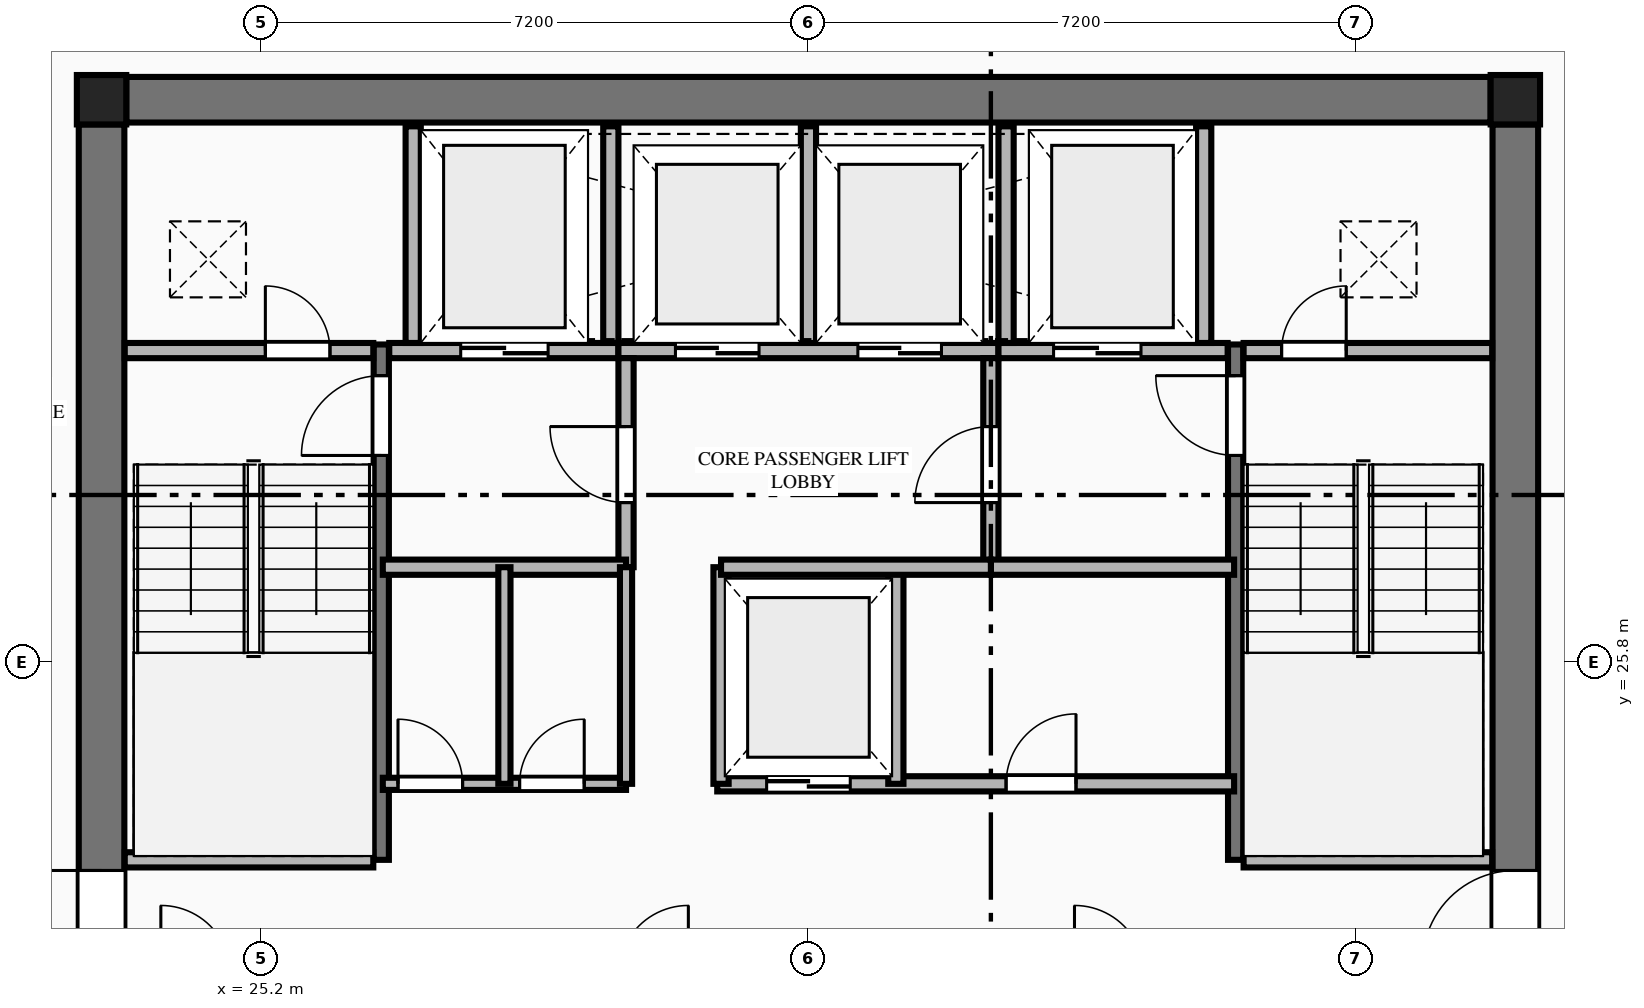
"""IFC4 building model, lengths in metres.
Left out: names, types, materials, properties, quantities, classifications, styles, units other than length and angle.
Written with IfcOpenShell. Run it as: python <this file> out.ifc"""

import sys

from ifc_helpers import new_model, si_unit, direction, frame, frame_2d, origin, origin_2d, place, context, subcontext, project, spatial, rectangle, extrude, element, fill, save


model = new_model("IFC4")
c1 = context("Model", 3, precision=1e-05, world=origin(), true_north=direction((0.0, 1.0)))
c2 = subcontext(c1, "Body", "Model", "MODEL_VIEW")
j1 = project(units=[si_unit("LENGTHUNIT", "METRE"), si_unit("PLANEANGLEUNIT", "RADIAN")], contexts=[c1])
p1 = place(None, origin())
s1 = spatial("IfcSite", under=j1, at=p1, CompositionType="ELEMENT")
p2 = place(p1, origin())
s2 = spatial("IfcBuilding", under=s1, at=p2, CompositionType="ELEMENT")
p3 = place(p2, frame((0.0, 0.0, 182.55)))
s3 = spatial("IfcBuildingStorey", under=s2, at=p3, CompositionType="ELEMENT", Elevation=182.55)
for number, where, z_axis, x_axis in (
    (1, (41.7, 33.2, 0.0), (0.0, 0.0, 1.0), (1.0, 0.0, 0.0)),
    (2, (23.1, 33.2, 0.0), (0.0, 0.0, 1.0), (1.0, 0.0, 0.0)),
):
    element("IfcColumn", number, at=place(p3, frame(where, z_axis=z_axis, x_axis=x_axis)), inside=s3, PredefinedType="COLUMN", context=c2, shape_type="SweptSolid", body=[
        extrude(rectangle(XDim=0.65, YDim=0.65, at=origin_2d()), origin(), (0.0, 0.0, 1.0), 3.55),
    ])
p4 = place(p3, frame((23.425, 33.2, 0.0), z_axis=(0.0, 0.0, 1.0), x_axis=(1.0, 0.0, 0.0)))
e3 = element("IfcWall", 3, at=p4, inside=s3, PredefinedType="SHEAR", context=c2, shape_type="SweptSolid", body=[
    extrude(rectangle(XDim=17.95, YDim=0.6, at=frame_2d((8.975, 0.0))), origin(), (0.0, 0.0, 1.0), 3.35),
])
p5 = place(p3, frame((23.1, 18.925, 0.0), z_axis=(0.0, 0.0, 1.0), x_axis=(0.0, 1.0, 0.0)))
e4 = element("IfcWall", 4, at=p5, inside=s3, PredefinedType="SHEAR", context=c2, shape_type="SweptSolid", body=[
    extrude(rectangle(XDim=13.95, YDim=0.6, at=frame_2d((6.975, 0.0))), origin(), (0.0, 0.0, 1.0), 3.35),
])
p6 = place(p5, frame((2.915, 0.0, 0.0)))
e5 = element("IfcOpeningElement", 5, at=p6, cuts=e4, PredefinedType="OPENING", context=c2, shape_type="SweptSolid", body=[
    extrude(rectangle(XDim=1.22, YDim=2.25, at=frame_2d((0.61, 1.125))), frame((0.0, 0.31, 0.0), z_axis=(0.0, -1.0, 0.0), x_axis=(1.0, 0.0, 0.0)), (0.0, 0.0, 1.0), 0.62),
])
p7 = place(p3, frame((41.7, 18.925, 0.0), z_axis=(0.0, 0.0, 1.0), x_axis=(0.0, 1.0, 0.0)))
e6 = element("IfcWall", 6, at=p7, inside=s3, PredefinedType="SHEAR", context=c2, shape_type="SweptSolid", body=[
    extrude(rectangle(XDim=13.95, YDim=0.6, at=frame_2d((6.975, 0.0))), origin(), (0.0, 0.0, 1.0), 3.35),
])
p8 = place(p7, frame((2.915, 0.0, 0.0)))
e7 = element("IfcOpeningElement", 7, at=p8, cuts=e6, PredefinedType="OPENING", context=c2, shape_type="SweptSolid", body=[
    extrude(rectangle(XDim=1.22, YDim=2.25, at=frame_2d((0.61, 1.125))), frame((0.0, 0.31, 0.0), z_axis=(0.0, -1.0, 0.0), x_axis=(1.0, 0.0, 0.0)), (0.0, 0.0, 1.0), 0.62),
])
p9 = place(p3, frame((26.78, 23.2, 0.0), z_axis=(0.0, 0.0, 1.0), x_axis=(0.0, 1.0, 0.0)))
e8 = element("IfcWall", 8, at=p9, inside=s3, PredefinedType="SHEAR", context=c2, shape_type="SweptSolid", body=[
    extrude(rectangle(XDim=6.78, YDim=0.2, at=frame_2d((3.39, 0.0))), origin(), (0.0, 0.0, 1.0), 3.55),
])
p10 = place(p9, frame((5.32, 0.0, 0.0)))
e9 = element("IfcOpeningElement", 9, at=p10, cuts=e8, PredefinedType="OPENING", context=c2, shape_type="SweptSolid", body=[
    extrude(rectangle(XDim=1.05, YDim=2.15, at=frame_2d((0.525, 1.075))), frame((0.0, 0.11, 0.0), z_axis=(0.0, -1.0, 0.0), x_axis=(1.0, 0.0, 0.0)), (0.0, 0.0, 1.0), 0.22),
])
p11 = place(p3, frame((23.405, 23.2, 0.0), z_axis=(0.0, 0.0, 1.0), x_axis=(1.0, 0.0, 0.0)))
e10 = element("IfcWall", 10, at=p11, inside=s3, PredefinedType="PLUMBINGWALL", context=c2, shape_type="SweptSolid", body=[
    extrude(rectangle(XDim=3.27, YDim=0.2, at=frame_2d((1.635, 0.0))), origin(), (0.0, 0.0, 1.0), 3.35),
])
p12 = place(p3, frame((38.02, 23.2, 0.0), z_axis=(0.0, 0.0, 1.0), x_axis=(0.0, 1.0, 0.0)))
e11 = element("IfcWall", 11, at=p12, inside=s3, PredefinedType="SHEAR", context=c2, shape_type="SweptSolid", body=[
    extrude(rectangle(XDim=6.78, YDim=0.2, at=frame_2d((3.39, 0.0))), origin(), (0.0, 0.0, 1.0), 3.55),
])
p13 = place(p12, frame((5.32, 0.0, 0.0)))
e12 = element("IfcOpeningElement", 12, at=p13, cuts=e11, PredefinedType="OPENING", context=c2, shape_type="SweptSolid", body=[
    extrude(rectangle(XDim=1.05, YDim=2.15, at=frame_2d((0.525, 1.075))), frame((0.0, 0.11, 0.0), z_axis=(0.0, -1.0, 0.0), x_axis=(1.0, 0.0, 0.0)), (0.0, 0.0, 1.0), 0.22),
])
p14 = place(p3, frame((38.125, 23.2, 0.0), z_axis=(0.0, 0.0, 1.0), x_axis=(1.0, 0.0, 0.0)))
e13 = element("IfcWall", 13, at=p14, inside=s3, PredefinedType="PLUMBINGWALL", context=c2, shape_type="SweptSolid", body=[
    extrude(rectangle(XDim=3.27, YDim=0.2, at=frame_2d((1.635, 0.0))), origin(), (0.0, 0.0, 1.0), 3.35),
])
p15 = place(p3, frame((23.405, 29.9, 0.0), z_axis=(0.0, 0.0, 1.0), x_axis=(1.0, 0.0, 0.0)))
e14 = element("IfcWall", 14, at=p15, inside=s3, PredefinedType="PLUMBINGWALL", context=c2, shape_type="SweptSolid", body=[
    extrude(rectangle(XDim=3.27, YDim=0.2, at=frame_2d((1.635, 0.0))), origin(), (0.0, 0.0, 1.0), 3.35),
])
p16 = place(p15, frame((1.85, 0.0, 0.0)))
e15 = element("IfcOpeningElement", 15, at=p16, cuts=e14, PredefinedType="OPENING", context=c2, shape_type="SweptSolid", body=[
    extrude(rectangle(XDim=0.85, YDim=2.05, at=frame_2d((0.425, 1.025))), frame((0.0, 0.11, 0.0), z_axis=(0.0, -1.0, 0.0), x_axis=(1.0, 0.0, 0.0)), (0.0, 0.0, 1.0), 0.22),
])
p17 = place(p3, frame((26.885, 29.9, 0.0), z_axis=(0.0, 0.0, 1.0), x_axis=(1.0, 0.0, 0.0)))
e16 = element("IfcWall", 16, at=p17, inside=s3, PredefinedType="PLUMBINGWALL", context=c2, shape_type="SweptSolid", body=[
    extrude(rectangle(XDim=3.015, YDim=0.2, at=frame_2d((1.507, 0.0))), origin(), (0.0, 0.0, 1.0), 3.35),
])
p18 = place(p17, frame((0.94, 0.0, 0.0)))
e17 = element("IfcOpeningElement", 17, at=p18, cuts=e16, PredefinedType="OPENING", context=c2, shape_type="SweptSolid", body=[
    extrude(rectangle(XDim=1.15, YDim=2.2, at=frame_2d((0.575, 1.1))), frame((0.0, 0.11, 0.0), z_axis=(0.0, -1.0, 0.0), x_axis=(1.0, 0.0, 0.0)), (0.0, 0.0, 1.0), 0.22),
])
p19 = place(p3, frame((29.9, 29.9, 0.0), z_axis=(0.0, 0.0, 1.0), x_axis=(1.0, 0.0, 0.0)))
e18 = element("IfcWall", 18, at=p19, inside=s3, PredefinedType="PLUMBINGWALL", context=c2, shape_type="SweptSolid", body=[
    extrude(rectangle(XDim=5.0, YDim=0.2, at=frame_2d((2.5, 0.0))), origin(), (0.0, 0.0, 1.0), 3.35),
])
p20 = place(p19, frame((0.75, 0.0, 0.0)))
e19 = element("IfcOpeningElement", 19, at=p20, cuts=e18, PredefinedType="OPENING", context=c2, shape_type="SweptSolid", body=[
    extrude(rectangle(XDim=1.1, YDim=2.2, at=frame_2d((0.55, 1.1))), frame((0.0, 0.11, 0.0), z_axis=(0.0, -1.0, 0.0), x_axis=(1.0, 0.0, 0.0)), (0.0, 0.0, 1.0), 0.22),
])
p21 = place(p19, frame((3.15, 0.0, 0.0)))
e20 = element("IfcOpeningElement", 20, at=p21, cuts=e18, PredefinedType="OPENING", context=c2, shape_type="SweptSolid", body=[
    extrude(rectangle(XDim=1.1, YDim=2.2, at=frame_2d((0.55, 1.1))), frame((0.0, 0.11, 0.0), z_axis=(0.0, -1.0, 0.0), x_axis=(1.0, 0.0, 0.0)), (0.0, 0.0, 1.0), 0.22),
])
p22 = place(p3, frame((34.9, 29.9, 0.0), z_axis=(0.0, 0.0, 1.0), x_axis=(1.0, 0.0, 0.0)))
e21 = element("IfcWall", 21, at=p22, inside=s3, PredefinedType="PLUMBINGWALL", context=c2, shape_type="SweptSolid", body=[
    extrude(rectangle(XDim=3.015, YDim=0.2, at=frame_2d((1.508, 0.0))), origin(), (0.0, 0.0, 1.0), 3.35),
])
p23 = place(p22, frame((0.725, 0.0, 0.0)))
e22 = element("IfcOpeningElement", 22, at=p23, cuts=e21, PredefinedType="OPENING", context=c2, shape_type="SweptSolid", body=[
    extrude(rectangle(XDim=1.15, YDim=2.2, at=frame_2d((0.575, 1.1))), frame((0.0, 0.11, 0.0), z_axis=(0.0, -1.0, 0.0), x_axis=(1.0, 0.0, 0.0)), (0.0, 0.0, 1.0), 0.22),
])
p24 = place(p3, frame((38.125, 29.9, 0.0), z_axis=(0.0, 0.0, 1.0), x_axis=(1.0, 0.0, 0.0)))
e23 = element("IfcWall", 23, at=p24, inside=s3, PredefinedType="PLUMBINGWALL", context=c2, shape_type="SweptSolid", body=[
    extrude(rectangle(XDim=3.27, YDim=0.2, at=frame_2d((1.635, 0.0))), origin(), (0.0, 0.0, 1.0), 3.35),
])
p25 = place(p24, frame((0.5, 0.0, 0.0)))
e24 = element("IfcOpeningElement", 24, at=p25, cuts=e23, PredefinedType="OPENING", context=c2, shape_type="SweptSolid", body=[
    extrude(rectangle(XDim=0.85, YDim=2.05, at=frame_2d((0.425, 1.025))), frame((0.0, 0.11, 0.0), z_axis=(0.0, -1.0, 0.0), x_axis=(1.0, 0.0, 0.0)), (0.0, 0.0, 1.0), 0.22),
])
for number, where, z_axis, x_axis in (
    (25, (27.2, 30.0, 0.0), (0.0, 0.0, 1.0), (0.0, 1.0, 0.0)),
    (26, (29.8, 30.0, 0.0), (0.0, 0.0, 1.0), (0.0, 1.0, 0.0)),
    (27, (32.4, 30.0, 0.0), (0.0, 0.0, 1.0), (0.0, 1.0, 0.0)),
    (28, (35.0, 30.0, 0.0), (0.0, 0.0, 1.0), (0.0, 1.0, 0.0)),
    (29, (37.6, 30.0, 0.0), (0.0, 0.0, 1.0), (0.0, 1.0, 0.0)),
):
    element("IfcWall", number, at=place(p3, frame(where, z_axis=z_axis, x_axis=x_axis)), inside=s3, PredefinedType="PLUMBINGWALL", context=c2, shape_type="SweptSolid", body=[
        extrude(rectangle(XDim=2.85, YDim=0.2, at=frame_2d((1.425, 0.0))), origin(), (0.0, 0.0, 1.0), 3.35),
    ])
p26 = place(p3, frame((30.0, 27.05, 0.0), z_axis=(0.0, 0.0, 1.0), x_axis=(0.0, 1.0, 0.0)))
e30 = element("IfcWall", 30, at=p26, inside=s3, PredefinedType="PLUMBINGWALL", context=c2, shape_type="SweptSolid", body=[
    extrude(rectangle(XDim=2.75, YDim=0.2, at=frame_2d((1.375, 0.0))), origin(), (0.0, 0.0, 1.0), 3.35),
])
p27 = place(p26, frame((0.85, 0.0, 0.0)))
e31 = element("IfcOpeningElement", 31, at=p27, cuts=e30, PredefinedType="OPENING", context=c2, shape_type="SweptSolid", body=[
    extrude(rectangle(XDim=1.0, YDim=2.15, at=frame_2d((0.5, 1.075))), frame((0.0, 0.11, 0.0), z_axis=(0.0, -1.0, 0.0), x_axis=(1.0, 0.0, 0.0)), (0.0, 0.0, 1.0), 0.22),
])
p28 = place(p3, frame((26.8, 27.05, 0.0), z_axis=(0.0, 0.0, 1.0), x_axis=(1.0, 0.0, 0.0)))
e32 = element("IfcWall", 32, at=p28, inside=s3, PredefinedType="PLUMBINGWALL", context=c2, shape_type="SweptSolid", body=[
    extrude(rectangle(XDim=3.2, YDim=0.2, at=frame_2d((1.6, 0.0))), origin(), (0.0, 0.0, 1.0), 3.35),
])
p29 = place(p3, frame((34.8, 27.05, 0.0), z_axis=(0.0, 0.0, 1.0), x_axis=(0.0, 1.0, 0.0)))
e33 = element("IfcWall", 33, at=p29, inside=s3, PredefinedType="PLUMBINGWALL", context=c2, shape_type="SweptSolid", body=[
    extrude(rectangle(XDim=2.75, YDim=0.2, at=frame_2d((1.375, 0.0))), origin(), (0.0, 0.0, 1.0), 3.35),
])
p30 = place(p29, frame((0.85, 0.0, 0.0)))
e34 = element("IfcOpeningElement", 34, at=p30, cuts=e33, PredefinedType="OPENING", context=c2, shape_type="SweptSolid", body=[
    extrude(rectangle(XDim=1.0, YDim=2.15, at=frame_2d((0.5, 1.075))), frame((0.0, 0.11, 0.0), z_axis=(0.0, -1.0, 0.0), x_axis=(1.0, 0.0, 0.0)), (0.0, 0.0, 1.0), 0.22),
])
p31 = place(p3, frame((34.8, 27.05, 0.0), z_axis=(0.0, 0.0, 1.0), x_axis=(1.0, 0.0, 0.0)))
e35 = element("IfcWall", 35, at=p31, inside=s3, PredefinedType="PLUMBINGWALL", context=c2, shape_type="SweptSolid", body=[
    extrude(rectangle(XDim=3.2, YDim=0.2, at=frame_2d((1.6, 0.0))), origin(), (0.0, 0.0, 1.0), 3.35),
])
p32 = place(p3, frame((26.8, 24.2, 0.0), z_axis=(0.0, 0.0, 1.0), x_axis=(1.0, 0.0, 0.0)))
e36 = element("IfcWall", 36, at=p32, inside=s3, PredefinedType="PARTITIONING", context=c2, shape_type="SweptSolid", body=[
    extrude(rectangle(XDim=3.2, YDim=0.16, at=frame_2d((1.6, 0.0))), origin(), (0.0, 0.0, 1.0), 3.35),
])
p33 = place(p32, frame((0.2, 0.0, 0.0)))
e37 = element("IfcOpeningElement", 37, at=p33, cuts=e36, PredefinedType="OPENING", context=c2, shape_type="SweptSolid", body=[
    extrude(rectangle(XDim=0.85, YDim=2.05, at=frame_2d((0.425, 1.025))), frame((0.0, 0.09, 0.0), z_axis=(0.0, -1.0, 0.0), x_axis=(1.0, 0.0, 0.0)), (0.0, 0.0, 1.0), 0.18),
])
p34 = place(p32, frame((1.8, 0.0, 0.0)))
e38 = element("IfcOpeningElement", 38, at=p34, cuts=e36, PredefinedType="OPENING", context=c2, shape_type="SweptSolid", body=[
    extrude(rectangle(XDim=0.85, YDim=2.05, at=frame_2d((0.425, 1.025))), frame((0.0, 0.09, 0.0), z_axis=(0.0, -1.0, 0.0), x_axis=(1.0, 0.0, 0.0)), (0.0, 0.0, 1.0), 0.18),
])
p35 = place(p3, frame((30.0, 24.2, 0.0), z_axis=(0.0, 0.0, 1.0), x_axis=(0.0, 1.0, 0.0)))
e39 = element("IfcWall", 39, at=p35, inside=s3, PredefinedType="PARTITIONING", context=c2, shape_type="SweptSolid", body=[
    extrude(rectangle(XDim=2.85, YDim=0.16, at=frame_2d((1.425, 0.0))), origin(), (0.0, 0.0, 1.0), 3.35),
])
p36 = place(p3, frame((31.2, 24.2, 0.0), z_axis=(0.0, 0.0, 1.0), x_axis=(1.0, 0.0, 0.0)))
e40 = element("IfcWall", 40, at=p36, inside=s3, PredefinedType="PLUMBINGWALL", context=c2, shape_type="SweptSolid", body=[
    extrude(rectangle(XDim=6.8, YDim=0.2, at=frame_2d((3.4, 0.0))), origin(), (0.0, 0.0, 1.0), 3.35),
])
p37 = place(p36, frame((0.65, 0.0, 0.0)))
e41 = element("IfcOpeningElement", 41, at=p37, cuts=e40, PredefinedType="OPENING", context=c2, shape_type="SweptSolid", body=[
    extrude(rectangle(XDim=1.1, YDim=2.2, at=frame_2d((0.55, 1.1))), frame((0.0, 0.11, 0.0), z_axis=(0.0, -1.0, 0.0), x_axis=(1.0, 0.0, 0.0)), (0.0, 0.0, 1.0), 0.22),
])
p38 = place(p36, frame((3.8, 0.0, 0.0)))
e42 = element("IfcOpeningElement", 42, at=p38, cuts=e40, PredefinedType="OPENING", context=c2, shape_type="SweptSolid", body=[
    extrude(rectangle(XDim=0.92, YDim=2.15, at=frame_2d((0.46, 1.075))), frame((0.0, 0.11, 0.0), z_axis=(0.0, -1.0, 0.0), x_axis=(1.0, 0.0, 0.0)), (0.0, 0.0, 1.0), 0.22),
])
for number, where, z_axis, x_axis in (
    (43, (31.25, 24.2, 0.0), (0.0, 0.0, 1.0), (0.0, 1.0, 0.0)),
    (44, (33.55, 24.2, 0.0), (0.0, 0.0, 1.0), (0.0, 1.0, 0.0)),
):
    element("IfcWall", number, at=place(p3, frame(where, z_axis=z_axis, x_axis=x_axis)), inside=s3, PredefinedType="PLUMBINGWALL", context=c2, shape_type="SweptSolid", body=[
        extrude(rectangle(XDim=2.85, YDim=0.2, at=frame_2d((1.425, 0.0))), origin(), (0.0, 0.0, 1.0), 3.35),
    ])
p39 = place(p3, frame((31.25, 27.05, 0.0), z_axis=(0.0, 0.0, 1.0), x_axis=(1.0, 0.0, 0.0)))
e45 = element("IfcWall", 45, at=p39, inside=s3, PredefinedType="PLUMBINGWALL", context=c2, shape_type="SweptSolid", body=[
    extrude(rectangle(XDim=3.55, YDim=0.2, at=frame_2d((1.775, 0.0))), origin(), (0.0, 0.0, 1.0), 3.35),
])
p40 = place(p3, frame((28.4, 24.2, 0.0), z_axis=(0.0, 0.0, 1.0), x_axis=(0.0, 1.0, 0.0)))
e46 = element("IfcWall", 46, at=p40, inside=s3, PredefinedType="PARTITIONING", context=c2, shape_type="SweptSolid", body=[
    extrude(rectangle(XDim=2.85, YDim=0.16, at=frame_2d((1.425, 0.0))), origin(), (0.0, 0.0, 1.0), 3.35),
])
p41 = place(p6, origin())
e47 = element("IfcDoor", 47, at=p41, inside=s3, OperationType="SINGLE_SWING_RIGHT", PredefinedType="DOOR", context=c2, shape_type="SweptSolid", body=[
    extrude(rectangle(XDim=1.22, YDim=2.25, at=frame_2d((0.61, 1.125))), frame((0.0, 0.025, 0.0), z_axis=(0.0, -1.0, 0.0), x_axis=(1.0, 0.0, 0.0)), (0.0, 0.0, 1.0), 0.05),
])
fill(e5, e47)
p42 = place(p8, origin())
e48 = element("IfcDoor", 48, at=p42, inside=s3, OperationType="SINGLE_SWING_LEFT", PredefinedType="DOOR", context=c2, shape_type="SweptSolid", body=[
    extrude(rectangle(XDim=1.22, YDim=2.25, at=frame_2d((0.61, 1.125))), frame((0.0, 0.025, 0.0), z_axis=(0.0, -1.0, 0.0), x_axis=(1.0, 0.0, 0.0)), (0.0, 0.0, 1.0), 0.05),
])
fill(e7, e48)
p43 = place(p10, origin())
e49 = element("IfcDoor", 49, at=p43, inside=s3, OperationType="SINGLE_SWING_LEFT", PredefinedType="DOOR", context=c2, shape_type="SweptSolid", body=[
    extrude(rectangle(XDim=1.05, YDim=2.15, at=frame_2d((0.525, 1.075))), frame((0.0, 0.025, 0.0), z_axis=(0.0, -1.0, 0.0), x_axis=(1.0, 0.0, 0.0)), (0.0, 0.0, 1.0), 0.05),
])
fill(e9, e49)
p44 = place(p13, origin())
e50 = element("IfcDoor", 50, at=p44, inside=s3, OperationType="SINGLE_SWING_RIGHT", PredefinedType="DOOR", context=c2, shape_type="SweptSolid", body=[
    extrude(rectangle(XDim=1.05, YDim=2.15, at=frame_2d((0.525, 1.075))), frame((0.0, 0.025, 0.0), z_axis=(0.0, -1.0, 0.0), x_axis=(1.0, 0.0, 0.0)), (0.0, 0.0, 1.0), 0.05),
])
fill(e12, e50)
p45 = place(p16, origin())
e51 = element("IfcDoor", 51, at=p45, inside=s3, OperationType="SINGLE_SWING_LEFT", PredefinedType="DOOR", context=c2, shape_type="SweptSolid", body=[
    extrude(rectangle(XDim=0.85, YDim=2.05, at=frame_2d((0.425, 1.025))), frame((0.0, 0.025, 0.0), z_axis=(0.0, -1.0, 0.0), x_axis=(1.0, 0.0, 0.0)), (0.0, 0.0, 1.0), 0.05),
])
fill(e15, e51)
p46 = place(p25, origin())
e52 = element("IfcDoor", 52, at=p46, inside=s3, OperationType="SINGLE_SWING_RIGHT", PredefinedType="DOOR", context=c2, shape_type="SweptSolid", body=[
    extrude(rectangle(XDim=0.85, YDim=2.05, at=frame_2d((0.425, 1.025))), frame((0.0, 0.025, 0.0), z_axis=(0.0, -1.0, 0.0), x_axis=(1.0, 0.0, 0.0)), (0.0, 0.0, 1.0), 0.05),
])
fill(e24, e52)
p47 = place(p18, origin())
e53 = element("IfcDoor", 53, at=p47, inside=s3, OperationType="DOUBLE_DOOR_SLIDING", PredefinedType="DOOR", context=c2, shape_type="SweptSolid", body=[
    extrude(rectangle(XDim=1.15, YDim=2.2, at=frame_2d((0.575, 1.1))), frame((0.0, 0.025, 0.0), z_axis=(0.0, -1.0, 0.0), x_axis=(1.0, 0.0, 0.0)), (0.0, 0.0, 1.0), 0.05),
])
fill(e17, e53)
p48 = place(p23, origin())
e54 = element("IfcDoor", 54, at=p48, inside=s3, OperationType="DOUBLE_DOOR_SLIDING", PredefinedType="DOOR", context=c2, shape_type="SweptSolid", body=[
    extrude(rectangle(XDim=1.15, YDim=2.2, at=frame_2d((0.575, 1.1))), frame((0.0, 0.025, 0.0), z_axis=(0.0, -1.0, 0.0), x_axis=(1.0, 0.0, 0.0)), (0.0, 0.0, 1.0), 0.05),
])
fill(e22, e54)
p49 = place(p20, origin())
e55 = element("IfcDoor", 55, at=p49, inside=s3, OperationType="DOUBLE_DOOR_SLIDING", PredefinedType="DOOR", context=c2, shape_type="SweptSolid", body=[
    extrude(rectangle(XDim=1.1, YDim=2.2, at=frame_2d((0.55, 1.1))), frame((0.0, 0.025, 0.0), z_axis=(0.0, -1.0, 0.0), x_axis=(1.0, 0.0, 0.0)), (0.0, 0.0, 1.0), 0.05),
])
fill(e19, e55)
p50 = place(p21, origin())
e56 = element("IfcDoor", 56, at=p50, inside=s3, OperationType="DOUBLE_DOOR_SLIDING", PredefinedType="DOOR", context=c2, shape_type="SweptSolid", body=[
    extrude(rectangle(XDim=1.1, YDim=2.2, at=frame_2d((0.55, 1.1))), frame((0.0, 0.025, 0.0), z_axis=(0.0, -1.0, 0.0), x_axis=(1.0, 0.0, 0.0)), (0.0, 0.0, 1.0), 0.05),
])
fill(e20, e56)
p51 = place(p27, origin())
e57 = element("IfcDoor", 57, at=p51, inside=s3, OperationType="SINGLE_SWING_RIGHT", PredefinedType="DOOR", context=c2, shape_type="SweptSolid", body=[
    extrude(rectangle(XDim=1.0, YDim=2.15, at=frame_2d((0.5, 1.075))), frame((0.0, 0.025, 0.0), z_axis=(0.0, -1.0, 0.0), x_axis=(1.0, 0.0, 0.0)), (0.0, 0.0, 1.0), 0.05),
])
fill(e31, e57)
p52 = place(p30, origin())
e58 = element("IfcDoor", 58, at=p52, inside=s3, OperationType="SINGLE_SWING_LEFT", PredefinedType="DOOR", context=c2, shape_type="SweptSolid", body=[
    extrude(rectangle(XDim=1.0, YDim=2.15, at=frame_2d((0.5, 1.075))), frame((0.0, 0.025, 0.0), z_axis=(0.0, -1.0, 0.0), x_axis=(1.0, 0.0, 0.0)), (0.0, 0.0, 1.0), 0.05),
])
fill(e34, e58)
p53 = place(p37, origin())
e59 = element("IfcDoor", 59, at=p53, inside=s3, OperationType="DOUBLE_DOOR_SLIDING", PredefinedType="DOOR", context=c2, shape_type="SweptSolid", body=[
    extrude(rectangle(XDim=1.1, YDim=2.2, at=frame_2d((0.55, 1.1))), frame((0.0, 0.025, 0.0), z_axis=(0.0, -1.0, 0.0), x_axis=(1.0, 0.0, 0.0)), (0.0, 0.0, 1.0), 0.05),
])
fill(e41, e59)
p54 = place(p33, origin())
e60 = element("IfcDoor", 60, at=p54, inside=s3, OperationType="SINGLE_SWING_LEFT", PredefinedType="DOOR", context=c2, shape_type="SweptSolid", body=[
    extrude(rectangle(XDim=0.85, YDim=2.05, at=frame_2d((0.425, 1.025))), frame((0.0, 0.025, 0.0), z_axis=(0.0, -1.0, 0.0), x_axis=(1.0, 0.0, 0.0)), (0.0, 0.0, 1.0), 0.05),
])
fill(e37, e60)
p55 = place(p34, origin())
e61 = element("IfcDoor", 61, at=p55, inside=s3, OperationType="SINGLE_SWING_RIGHT", PredefinedType="DOOR", context=c2, shape_type="SweptSolid", body=[
    extrude(rectangle(XDim=0.85, YDim=2.05, at=frame_2d((0.425, 1.025))), frame((0.0, 0.025, 0.0), z_axis=(0.0, -1.0, 0.0), x_axis=(1.0, 0.0, 0.0)), (0.0, 0.0, 1.0), 0.05),
])
fill(e38, e61)
p56 = place(p38, origin())
e62 = element("IfcDoor", 62, at=p56, inside=s3, OperationType="SINGLE_SWING_RIGHT", PredefinedType="DOOR", context=c2, shape_type="SweptSolid", body=[
    extrude(rectangle(XDim=0.92, YDim=2.15, at=frame_2d((0.46, 1.075))), frame((0.0, 0.025, 0.0), z_axis=(0.0, -1.0, 0.0), x_axis=(1.0, 0.0, 0.0)), (0.0, 0.0, 1.0), 0.05),
])
fill(e42, e62)
save(model, sys.argv[1])
